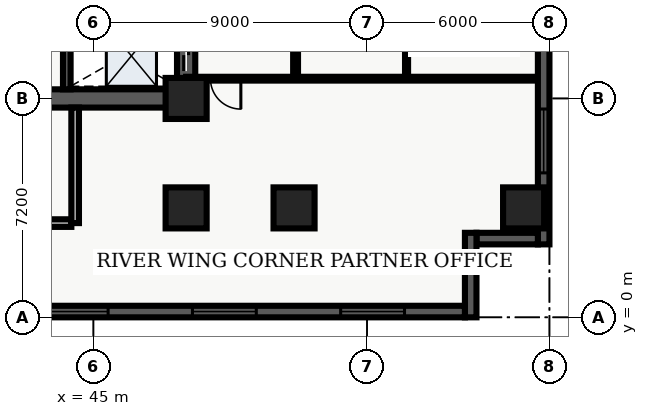
"""IFC4 building model, lengths in metres.
Left out: names, types, materials, properties, quantities, classifications, styles, units other than length and angle.
Written with IfcOpenShell. Run it as: python <this file> out.ifc"""

import sys

from ifc_helpers import new_model, entity, si_unit, converted_unit, direction, frame, origin_with_axes, origin_2d_with_axis, place, context, subcontext, project, spatial, polyline, rectangle, outline, extrude, element, fill, save


model = new_model("IFC4")
c1 = context("Model", 3, precision=1e-05, world=origin_with_axes(), true_north=direction((0.0, 1.0)))
c2 = subcontext(c1, "Body", "Model", "MODEL_VIEW")
j1 = project(units=[si_unit("LENGTHUNIT", "METRE"), converted_unit("PLANEANGLEUNIT", "DEGREE", entity("IfcPlaneAngleMeasure", 0.017), si_unit("PLANEANGLEUNIT", "RADIAN"), dimensions=[0, 0, 0, 0, 0, 0, 0])], contexts=[c1])
p1 = place(None, origin_with_axes())
s1 = spatial("IfcSite", under=j1, at=p1, CompositionType="ELEMENT")
p2 = place(p1, origin_with_axes())
s2 = spatial("IfcBuilding", under=s1, at=p2, CompositionType="ELEMENT")
p3 = place(p2, frame((0.0, 0.0, 75.6), z_axis=(0.0, 0.0, 1.0), x_axis=(1.0, 0.0, 0.0)))
s3 = spatial("IfcBuildingStorey", under=s2, at=p3, CompositionType="ELEMENT", Elevation=75.6)
p4 = place(p3, frame((40.2, 7.2, 0.0), z_axis=(0.0, 0.0, 1.0), x_axis=(1.0, 0.0, 0.0)))
e1 = element("IfcWall", 1, at=p4, inside=s3, PredefinedType="SHEAR", context=c2, shape_type="SweptSolid", body=[
    extrude(outline(polyline([(0.0, -0.3), (7.85, -0.3), (7.85, 0.3), (0.0, 0.3), (0.0, -0.3)])), origin_with_axes(), (0.0, 0.0, 1.0), 3.6),
])
p5 = place(p4, frame((2.175, 0.0, 0.0), z_axis=(0.0, 0.0, 1.0), x_axis=(1.0, 0.0, 0.0)))
e2 = element("IfcOpeningElement", 2, at=p5, cuts=e1, PredefinedType="OPENING", context=c2, shape_type="SweptSolid", body=[
    extrude(rectangle(XDim=1.05, YDim=0.62, at=origin_2d_with_axis()), origin_with_axes(), (0.0, 0.0, 1.0), 2.15),
])
p6 = place(p3, frame((48.05, 7.2, 0.0), z_axis=(0.0, 0.0, 1.0), x_axis=(0.0, 1.0, 0.0)))
e3 = element("IfcWall", 3, at=p6, inside=s3, PredefinedType="SHEAR", context=c2, shape_type="SweptSolid", body=[
    extrude(outline(polyline([(0.0, -0.3), (15.6, -0.3), (15.6, 0.3), (0.0, 0.3), (0.0, -0.3)])), origin_with_axes(), (0.0, 0.0, 1.0), 3.6),
])
p7 = place(p6, frame((1.425, 0.0, 0.0), z_axis=(0.0, 0.0, 1.0), x_axis=(1.0, 0.0, 0.0)))
e4 = element("IfcOpeningElement", 4, at=p7, cuts=e3, PredefinedType="OPENING", context=c2, shape_type="SweptSolid", body=[
    extrude(rectangle(XDim=1.05, YDim=0.62, at=origin_2d_with_axis()), origin_with_axes(), (0.0, 0.0, 1.0), 2.15),
])
p8 = place(p6, frame((3.475, 0.0, 0.0), z_axis=(0.0, 0.0, 1.0), x_axis=(1.0, 0.0, 0.0)))
e5 = element("IfcOpeningElement", 5, at=p8, cuts=e3, PredefinedType="OPENING", context=c2, shape_type="SweptSolid", body=[
    extrude(rectangle(XDim=1.05, YDim=0.62, at=origin_2d_with_axis()), origin_with_axes(), (0.0, 0.0, 1.0), 2.15),
])
p9 = place(p6, frame((5.625, 0.0, 0.0), z_axis=(0.0, 0.0, 1.0), x_axis=(1.0, 0.0, 0.0)))
e6 = element("IfcOpeningElement", 6, at=p9, cuts=e3, PredefinedType="OPENING", context=c2, shape_type="SweptSolid", body=[
    extrude(rectangle(XDim=0.95, YDim=0.62, at=origin_2d_with_axis()), origin_with_axes(), (0.0, 0.0, 1.0), 2.15),
])
p10 = place(p3, frame((44.125, 7.5, 0.0), z_axis=(0.0, 0.0, 1.0), x_axis=(0.0, 1.0, 0.0)))
e7 = element("IfcWall", 7, at=p10, inside=s3, PredefinedType="SHEAR", context=c2, shape_type="SweptSolid", body=[
    extrude(outline(polyline([(0.0, -0.125), (15.0, -0.125), (15.0, 0.125), (0.0, 0.125), (0.0, -0.125)])), origin_with_axes(), (0.0, 0.0, 1.0), 3.6),
])
p11 = place(p3, frame((40.325, 3.1, 0.0), z_axis=(0.0, 0.0, 1.0), x_axis=(1.0, 0.0, 0.0)))
e8 = element("IfcWall", 8, at=p11, inside=s3, PredefinedType="SOLIDWALL", context=c2, shape_type="SweptSolid", body=[
    extrude(outline(polyline([(0.0, -0.125), (3.95, -0.125), (3.95, 0.125), (0.0, 0.125), (0.0, -0.125)])), origin_with_axes(), (0.0, 0.0, 1.0), 2.64),
])
p12 = place(p3, frame((44.4, 3.1, 0.0), z_axis=(0.0, 0.0, 1.0), x_axis=(0.0, 1.0, 0.0)))
e9 = element("IfcWall", 9, at=p12, inside=s3, PredefinedType="SOLIDWALL", context=c2, shape_type="SweptSolid", body=[
    extrude(outline(polyline([(0.0, -0.125), (3.8, -0.125), (3.8, 0.125), (0.0, 0.125), (0.0, -0.125)])), origin_with_axes(), (0.0, 0.0, 1.0), 2.64),
])
for number, where, z_axis, x_axis in (
    (10, (48.05, 3.6, 0.0), (0.0, 0.0, 1.0), (1.0, 0.0, 0.0)),
    (11, (48.05, 7.2, 0.0), (0.0, 0.0, 1.0), (1.0, 0.0, 0.0)),
    (12, (51.6, 3.6, 0.0), (0.0, 0.0, 1.0), (1.0, 0.0, 0.0)),
    (13, (59.15, 3.6, 0.0), (0.0, 0.0, 1.0), (1.0, 0.0, 0.0)),
):
    element("IfcColumn", number, at=place(p3, frame(where, z_axis=z_axis, x_axis=x_axis)), inside=s3, PredefinedType="COLUMN", context=c2, shape_type="SweptSolid", body=[
        extrude(rectangle(XDim=1.35, YDim=1.35, at=origin_2d_with_axis()), origin_with_axes(), (0.0, 0.0, 1.0), 3.9),
    ])
p13 = place(p3, frame((51.65, 7.85, 0.0), z_axis=(0.0, 0.0, 1.0), x_axis=(0.0, 1.0, 0.0)))
e14 = element("IfcWall", 14, at=p13, inside=s3, PredefinedType="PARTITIONING", context=c2, shape_type="SweptSolid", body=[
    extrude(outline(polyline([(0.0, -0.08), (18.8, -0.08), (18.8, 0.08), (0.0, 0.08), (0.0, -0.08)])), origin_with_axes(), (0.0, 0.0, 1.0), 2.64),
])
p14 = place(p13, frame((4.443, 0.0, 0.0), z_axis=(0.0, 0.0, 1.0), x_axis=(1.0, 0.0, 0.0)))
e15 = element("IfcOpeningElement", 15, at=p14, cuts=e14, PredefinedType="OPENING", context=c2, shape_type="SweptSolid", body=[
    extrude(rectangle(XDim=1.0, YDim=0.18, at=origin_2d_with_axis()), origin_with_axes(), (0.0, 0.0, 1.0), 2.15),
])
p15 = place(p13, frame((13.503, 0.0, 0.0), z_axis=(0.0, 0.0, 1.0), x_axis=(1.0, 0.0, 0.0)))
e16 = element("IfcOpeningElement", 16, at=p15, cuts=e14, PredefinedType="OPENING", context=c2, shape_type="SweptSolid", body=[
    extrude(rectangle(XDim=1.0, YDim=0.18, at=origin_2d_with_axis()), origin_with_axes(), (0.0, 0.0, 1.0), 2.15),
])
p16 = place(p3, frame((59.64, 7.85, 0.0), z_axis=(0.0, 0.0, 1.0), x_axis=(-1.0, 0.0, 0.0)))
e17 = element("IfcWall", 17, at=p16, inside=s3, PredefinedType="PARTITIONING", context=c2, shape_type="SweptSolid", body=[
    extrude(outline(polyline([(0.0, -0.062), (11.59, -0.062), (11.59, 0.062), (0.0, 0.062), (0.0, -0.062)])), origin_with_axes(), (0.0, 0.0, 1.0), 2.64),
])
p17 = place(p16, frame((10.29, 0.0, 0.0), z_axis=(0.0, 0.0, 1.0), x_axis=(1.0, 0.0, 0.0)))
e18 = element("IfcOpeningElement", 18, at=p17, cuts=e17, PredefinedType="OPENING", context=c2, shape_type="SweptSolid", body=[
    extrude(rectangle(XDim=1.0, YDim=0.145, at=origin_2d_with_axis()), origin_with_axes(), (0.0, 0.0, 1.0), 2.15),
])
p18 = place(p3, frame((55.3, 7.98, 0.0), z_axis=(0.0, 0.0, 1.0), x_axis=(0.0, 1.0, 0.0)))
e19 = element("IfcWall", 19, at=p18, inside=s3, PredefinedType="PARTITIONING", context=c2, shape_type="SweptSolid", body=[
    extrude(outline(polyline([(0.0, -0.05), (18.54, -0.05), (18.54, 0.05), (0.0, 0.05), (0.0, -0.05)])), origin_with_axes(), (0.0, 0.0, 1.0), 2.64),
])
p19 = place(p18, frame((4.033, 0.0, 0.0), z_axis=(0.0, 0.0, 1.0), x_axis=(1.0, 0.0, 0.0)))
e20 = element("IfcOpeningElement", 20, at=p19, cuts=e19, PredefinedType="OPENING", context=c2, shape_type="SweptSolid", body=[
    extrude(rectangle(XDim=0.95, YDim=0.12, at=origin_2d_with_axis()), origin_with_axes(), (0.0, 0.0, 1.0), 2.15),
])
p20 = place(p18, frame((13.373, 0.0, 0.0), z_axis=(0.0, 0.0, 1.0), x_axis=(1.0, 0.0, 0.0)))
e21 = element("IfcOpeningElement", 21, at=p20, cuts=e19, PredefinedType="OPENING", context=c2, shape_type="SweptSolid", body=[
    extrude(rectangle(XDim=0.95, YDim=0.12, at=origin_2d_with_axis()), origin_with_axes(), (0.0, 0.0, 1.0), 2.15),
])
p21 = place(p3, frame((59.81, 26.02, 0.0), z_axis=(0.0, 0.0, 1.0), x_axis=(0.0, -1.0, 0.0)))
e22 = element("IfcWall", 22, at=p21, inside=s3, PredefinedType="SOLIDWALL", context=c2, shape_type="SweptSolid", body=[
    extrude(outline(polyline([(0.0, -0.19), (23.62, -0.19), (23.62, 0.19), (0.0, 0.19), (0.0, -0.19)])), origin_with_axes(), (0.0, 0.0, 1.0), 3.6),
])
p22 = place(p21, frame((3.853, 0.0, 0.45), z_axis=(0.0, 0.0, 1.0), x_axis=(1.0, 0.0, 0.0)))
e23 = element("IfcOpeningElement", 23, at=p22, cuts=e22, PredefinedType="OPENING", context=c2, shape_type="SweptSolid", body=[
    extrude(rectangle(XDim=2.1, YDim=0.4, at=origin_2d_with_axis()), origin_with_axes(), (0.0, 0.0, 1.0), 2.2),
])
p23 = place(p21, frame((20.218, 0.0, 0.45), z_axis=(0.0, 0.0, 1.0), x_axis=(1.0, 0.0, 0.0)))
e24 = element("IfcOpeningElement", 24, at=p23, cuts=e22, PredefinedType="OPENING", context=c2, shape_type="SweptSolid", body=[
    extrude(rectangle(XDim=2.1, YDim=0.4, at=origin_2d_with_axis()), origin_with_axes(), (0.0, 0.0, 1.0), 2.2),
])
p24 = place(p3, frame((59.62, 2.59, 0.0), z_axis=(0.0, 0.0, 1.0), x_axis=(-1.0, 0.0, 0.0)))
e25 = element("IfcWall", 25, at=p24, inside=s3, PredefinedType="SOLIDWALL", context=c2, shape_type="SweptSolid", body=[
    extrude(outline(polyline([(0.0, -0.19), (2.02, -0.19), (2.02, 0.19), (0.0, 0.19), (0.0, -0.19)])), origin_with_axes(), (0.0, 0.0, 1.0), 3.6),
])
p25 = place(p3, frame((57.41, 2.78, 0.0), z_axis=(0.0, 0.0, 1.0), x_axis=(0.0, -1.0, 0.0)))
e26 = element("IfcWall", 26, at=p25, inside=s3, PredefinedType="SOLIDWALL", context=c2, shape_type="SweptSolid", body=[
    extrude(outline(polyline([(0.0, -0.19), (2.78, -0.19), (2.78, 0.19), (0.0, 0.19), (0.0, -0.19)])), origin_with_axes(), (0.0, 0.0, 1.0), 3.6),
])
p26 = place(p3, frame((57.22, 0.19, 0.0), z_axis=(0.0, 0.0, 1.0), x_axis=(-1.0, 0.0, 0.0)))
e27 = element("IfcWall", 27, at=p26, inside=s3, PredefinedType="SOLIDWALL", context=c2, shape_type="SweptSolid", body=[
    extrude(outline(polyline([(0.0, -0.19), (54.82, -0.19), (54.82, 0.19), (0.0, 0.19), (0.0, -0.19)])), origin_with_axes(), (0.0, 0.0, 1.0), 3.6),
])
p27 = place(p26, frame((3.037, 0.0, 0.45), z_axis=(0.0, 0.0, 1.0), x_axis=(1.0, 0.0, 0.0)))
e28 = element("IfcOpeningElement", 28, at=p27, cuts=e27, PredefinedType="OPENING", context=c2, shape_type="SweptSolid", body=[
    extrude(rectangle(XDim=2.1, YDim=0.4, at=origin_2d_with_axis()), origin_with_axes(), (0.0, 0.0, 1.0), 2.2),
])
p28 = place(p26, frame((7.912, 0.0, 0.45), z_axis=(0.0, 0.0, 1.0), x_axis=(1.0, 0.0, 0.0)))
e29 = element("IfcOpeningElement", 29, at=p28, cuts=e27, PredefinedType="OPENING", context=c2, shape_type="SweptSolid", body=[
    extrude(rectangle(XDim=2.1, YDim=0.4, at=origin_2d_with_axis()), origin_with_axes(), (0.0, 0.0, 1.0), 2.2),
])
p29 = place(p26, frame((12.786, 0.0, 0.45), z_axis=(0.0, 0.0, 1.0), x_axis=(1.0, 0.0, 0.0)))
e30 = element("IfcOpeningElement", 30, at=p29, cuts=e27, PredefinedType="OPENING", context=c2, shape_type="SweptSolid", body=[
    extrude(rectangle(XDim=2.1, YDim=0.4, at=origin_2d_with_axis()), origin_with_axes(), (0.0, 0.0, 1.0), 2.2),
])
p30 = place(p26, frame((17.661, 0.0, 0.45), z_axis=(0.0, 0.0, 1.0), x_axis=(1.0, 0.0, 0.0)))
e31 = element("IfcOpeningElement", 31, at=p30, cuts=e27, PredefinedType="OPENING", context=c2, shape_type="SweptSolid", body=[
    extrude(rectangle(XDim=2.1, YDim=0.4, at=origin_2d_with_axis()), origin_with_axes(), (0.0, 0.0, 1.0), 2.2),
])
p31 = place(p26, frame((22.535, 0.0, 0.45), z_axis=(0.0, 0.0, 1.0), x_axis=(1.0, 0.0, 0.0)))
e32 = element("IfcOpeningElement", 32, at=p31, cuts=e27, PredefinedType="OPENING", context=c2, shape_type="SweptSolid", body=[
    extrude(rectangle(XDim=2.1, YDim=0.4, at=origin_2d_with_axis()), origin_with_axes(), (0.0, 0.0, 1.0), 2.2),
])
p32 = place(p26, frame((27.41, 0.0, 0.45), z_axis=(0.0, 0.0, 1.0), x_axis=(1.0, 0.0, 0.0)))
e33 = element("IfcOpeningElement", 33, at=p32, cuts=e27, PredefinedType="OPENING", context=c2, shape_type="SweptSolid", body=[
    extrude(rectangle(XDim=2.1, YDim=0.4, at=origin_2d_with_axis()), origin_with_axes(), (0.0, 0.0, 1.0), 2.2),
])
p33 = place(p26, frame((32.285, 0.0, 0.45), z_axis=(0.0, 0.0, 1.0), x_axis=(1.0, 0.0, 0.0)))
e34 = element("IfcOpeningElement", 34, at=p33, cuts=e27, PredefinedType="OPENING", context=c2, shape_type="SweptSolid", body=[
    extrude(rectangle(XDim=2.1, YDim=0.4, at=origin_2d_with_axis()), origin_with_axes(), (0.0, 0.0, 1.0), 2.2),
])
p34 = place(p26, frame((37.159, 0.0, 0.45), z_axis=(0.0, 0.0, 1.0), x_axis=(1.0, 0.0, 0.0)))
e35 = element("IfcOpeningElement", 35, at=p34, cuts=e27, PredefinedType="OPENING", context=c2, shape_type="SweptSolid", body=[
    extrude(rectangle(XDim=2.1, YDim=0.4, at=origin_2d_with_axis()), origin_with_axes(), (0.0, 0.0, 1.0), 2.2),
])
p35 = place(p26, frame((42.034, 0.0, 0.45), z_axis=(0.0, 0.0, 1.0), x_axis=(1.0, 0.0, 0.0)))
e36 = element("IfcOpeningElement", 36, at=p35, cuts=e27, PredefinedType="OPENING", context=c2, shape_type="SweptSolid", body=[
    extrude(rectangle(XDim=2.1, YDim=0.4, at=origin_2d_with_axis()), origin_with_axes(), (0.0, 0.0, 1.0), 2.2),
])
p36 = place(p26, frame((47.758, 0.0, 0.45), z_axis=(0.0, 0.0, 1.0), x_axis=(1.0, 0.0, 0.0)))
e37 = element("IfcOpeningElement", 37, at=p36, cuts=e27, PredefinedType="OPENING", context=c2, shape_type="SweptSolid", body=[
    extrude(rectangle(XDim=2.1, YDim=0.4, at=origin_2d_with_axis()), origin_with_axes(), (0.0, 0.0, 1.0), 2.2),
])
p37 = place(p26, frame((52.233, 0.0, 0.45), z_axis=(0.0, 0.0, 1.0), x_axis=(1.0, 0.0, 0.0)))
e38 = element("IfcOpeningElement", 38, at=p37, cuts=e27, PredefinedType="OPENING", context=c2, shape_type="SweptSolid", body=[
    extrude(rectangle(XDim=2.1, YDim=0.4, at=origin_2d_with_axis()), origin_with_axes(), (0.0, 0.0, 1.0), 2.2),
])
p38 = place(p6, frame((1.425, 0.0, 0.0), z_axis=(0.0, 0.0, 1.0), x_axis=(1.0, 0.0, 0.0)))
e39 = element("IfcDoor", 39, at=p38, inside=s3, OperationType="SLIDING_TO_LEFT", PredefinedType="DOOR", context=c2, shape_type="SweptSolid", body=[
    extrude(rectangle(XDim=1.05, YDim=0.09, at=origin_2d_with_axis()), origin_with_axes(), (0.0, 0.0, 1.0), 2.15),
])
fill(e4, e39)
p39 = place(p16, frame((10.29, 0.0, 0.0), z_axis=(0.0, 0.0, 1.0), x_axis=(1.0, 0.0, 0.0)))
e40 = element("IfcDoor", 40, at=p39, inside=s3, OperationType="SINGLE_SWING_LEFT", PredefinedType="DOOR", context=c2, shape_type="SweptSolid", body=[
    extrude(rectangle(XDim=1.0, YDim=0.075, at=origin_2d_with_axis()), origin_with_axes(), (0.0, 0.0, 1.0), 2.15),
])
fill(e18, e40)
p40 = place(p21, frame((20.218, 0.0, 0.45), z_axis=(0.0, 0.0, 1.0), x_axis=(1.0, 0.0, 0.0)))
e41 = element("IfcWindow", 41, at=p40, inside=s3, PredefinedType="WINDOW", context=c2, shape_type="SweptSolid", body=[
    extrude(rectangle(XDim=2.1, YDim=0.09, at=origin_2d_with_axis()), origin_with_axes(), (0.0, 0.0, 1.0), 2.2),
])
fill(e24, e41)
p41 = place(p26, frame((3.037, 0.0, 0.45), z_axis=(0.0, 0.0, 1.0), x_axis=(1.0, 0.0, 0.0)))
e42 = element("IfcWindow", 42, at=p41, inside=s3, PredefinedType="WINDOW", context=c2, shape_type="SweptSolid", body=[
    extrude(rectangle(XDim=2.1, YDim=0.09, at=origin_2d_with_axis()), origin_with_axes(), (0.0, 0.0, 1.0), 2.2),
])
fill(e28, e42)
p42 = place(p26, frame((7.912, 0.0, 0.45), z_axis=(0.0, 0.0, 1.0), x_axis=(1.0, 0.0, 0.0)))
e43 = element("IfcWindow", 43, at=p42, inside=s3, PredefinedType="WINDOW", context=c2, shape_type="SweptSolid", body=[
    extrude(rectangle(XDim=2.1, YDim=0.09, at=origin_2d_with_axis()), origin_with_axes(), (0.0, 0.0, 1.0), 2.2),
])
fill(e29, e43)
p43 = place(p26, frame((12.786, 0.0, 0.45), z_axis=(0.0, 0.0, 1.0), x_axis=(1.0, 0.0, 0.0)))
e44 = element("IfcWindow", 44, at=p43, inside=s3, PredefinedType="WINDOW", context=c2, shape_type="SweptSolid", body=[
    extrude(rectangle(XDim=2.1, YDim=0.09, at=origin_2d_with_axis()), origin_with_axes(), (0.0, 0.0, 1.0), 2.2),
])
fill(e30, e44)
save(model, sys.argv[1])
